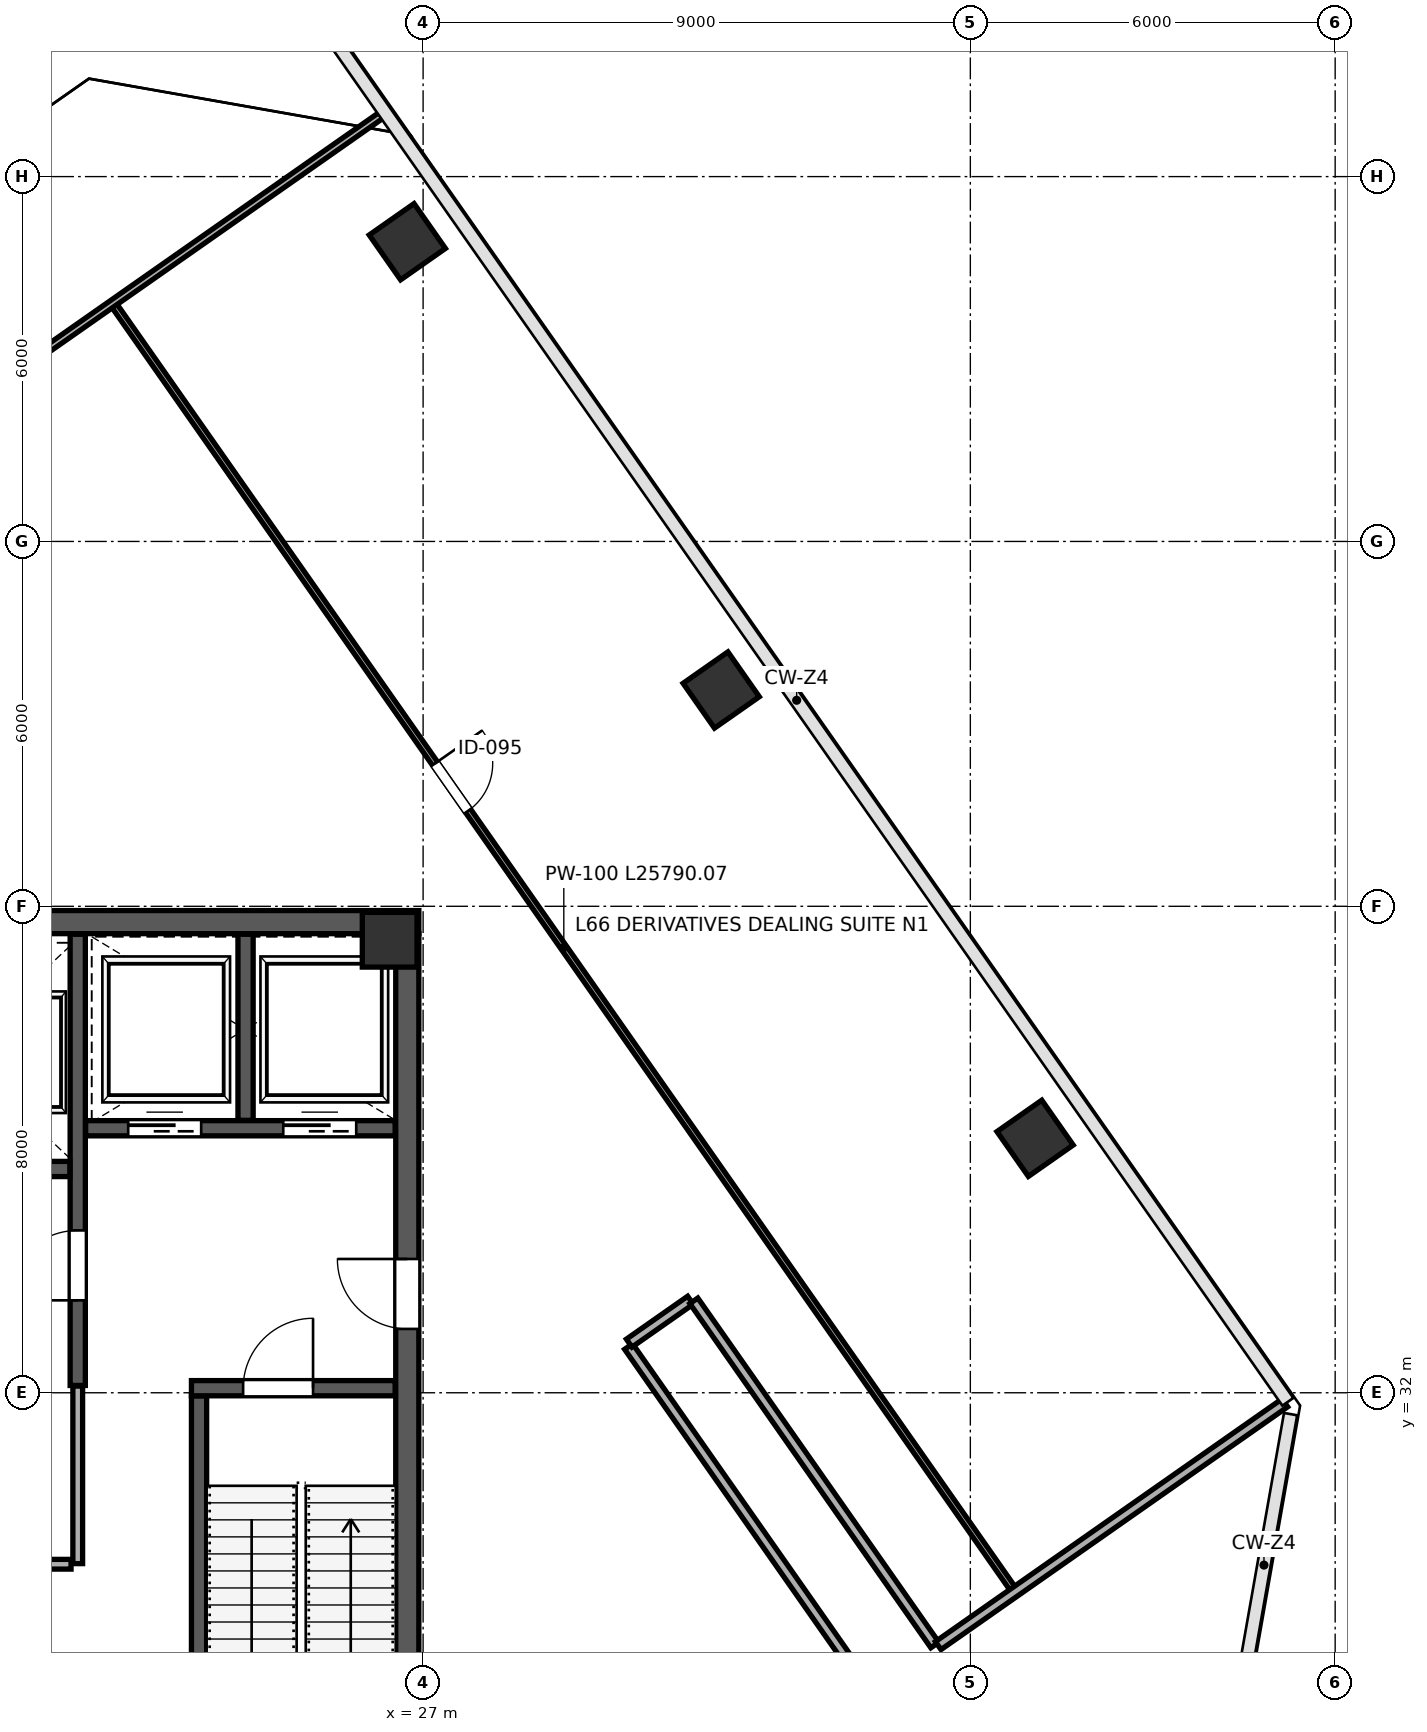
"""IFC4 building model, lengths in metres.
Left out: names, types, materials, properties, quantities, classifications, styles, units other than length and angle.
Written with IfcOpenShell. Run it as: python <this file> out.ifc"""

import sys

from ifc_helpers import new_model, si_unit, direction, frame, frame_2d, origin, origin_2d, place, context, subcontext, project, spatial, rectangle, extrude, source, transform, mapped, element, fill, save


model = new_model("IFC4")
c1 = context("Model", 3, precision=1e-05, world=origin(), true_north=direction((0.0, 1.0)))
c2 = subcontext(c1, "Body", "Model", "MODEL_VIEW")
j1 = project(units=[si_unit("LENGTHUNIT", "METRE"), si_unit("PLANEANGLEUNIT", "RADIAN")], contexts=[c1])
p1 = place(None, origin())
s1 = spatial("IfcSite", under=j1, at=p1, CompositionType="ELEMENT")
p2 = place(p1, origin())
s2 = spatial("IfcBuilding", under=s1, at=p2, CompositionType="ELEMENT")
p3 = place(p2, frame((0.0, 0.0, 293.8)))
s3 = spatial("IfcBuildingStorey", under=s2, at=p3, CompositionType="ELEMENT", Elevation=293.8)
m1 = source(origin(), c2, "Body", "SweptSolid", [
    extrude(rectangle(XDim=0.9, YDim=0.9, at=origin_2d()), origin(), (0.0, 0.0, 1.0), 4.999),
])
p4 = place(p3, frame((26.45, 39.45, 0.001), z_axis=(0.0, 0.0, 1.0), x_axis=(1.0, 0.0, 0.0)))
e1 = element("IfcColumn", 1, at=p4, inside=s3, PredefinedType="COLUMN", context=c2, shape_type="MappedRepresentation", body=[
    mapped(m1, transform((0.0, 0.0, 0.0), scale=1.0)),
])
m2 = source(origin(), c2, "Body", "SweptSolid", [
    extrude(rectangle(XDim=0.9, YDim=0.9, at=origin_2d()), origin(), (0.0, 0.0, 1.0), 4.999),
])
for number, where, z_axis, x_axis in (
    (2, (26.74, 50.929, 0.001), (0.0, 0.0, 1.0), (-0.574, 0.819, 0.0)),
    (3, (31.903, 43.557, 0.001), (0.0, 0.0, 1.0), (-0.574, 0.819, 0.0)),
    (4, (37.065, 36.184, 0.001), (0.0, 0.0, 1.0), (-0.574, 0.819, 0.0)),
):
    element("IfcColumn", number, at=place(p3, frame(where, z_axis=z_axis, x_axis=x_axis)), inside=s3, PredefinedType="COLUMN", context=c2, shape_type="MappedRepresentation", body=[
        mapped(m2, transform((0.0, 0.0, 0.0), scale=1.0)),
    ])
p5 = place(p3, frame((26.74, 24.45, 0.0), z_axis=(0.0, 0.0, 1.0), x_axis=(0.0, 1.0, 0.0)))
e5 = element("IfcWall", 5, at=p5, inside=s3, PredefinedType="SHEAR", context=c2, shape_type="SweptSolid", body=[
    extrude(rectangle(XDim=15.1, YDim=0.38, at=frame_2d((7.55, 0.0))), origin(), (0.0, 0.0, 1.0), 4.76),
])
p6 = place(p5, frame((8.6, 0.0, 0.0)))
e6 = element("IfcOpeningElement", 6, at=p6, cuts=e5, PredefinedType="OPENING", context=c2, shape_type="SweptSolid", body=[
    extrude(rectangle(XDim=1.15, YDim=2.2, at=frame_2d((0.575, 1.1))), frame((0.0, 0.2, 0.0), z_axis=(0.0, -1.0, 0.0), x_axis=(1.0, 0.0, 0.0)), (0.0, 0.0, 1.0), 0.4),
])
p7 = place(p3, frame((9.07, 39.74, 0.0), z_axis=(0.0, 0.0, 1.0), x_axis=(1.0, 0.0, 0.0)))
e7 = element("IfcWall", 7, at=p7, inside=s3, PredefinedType="SHEAR", context=c2, shape_type="SweptSolid", body=[
    extrude(rectangle(XDim=17.86, YDim=0.38, at=frame_2d((8.93, 0.0))), origin(), (0.0, 0.0, 1.0), 4.76),
])
p8 = place(p3, frame((23.315, 24.46, 0.0), z_axis=(0.0, 0.0, 1.0), x_axis=(0.0, 1.0, 0.0)))
e8 = element("IfcWall", 8, at=p8, inside=s3, PredefinedType="SHEAR", context=c2, shape_type="SweptSolid", body=[
    extrude(rectangle(XDim=7.49, YDim=0.25, at=frame_2d((3.745, 0.0))), origin(), (0.0, 0.0, 1.0), 4.76),
])
p9 = place(p3, frame((23.19, 32.075, 0.0), z_axis=(0.0, 0.0, 1.0), x_axis=(1.0, 0.0, 0.0)))
e9 = element("IfcWall", 9, at=p9, inside=s3, PredefinedType="SHEAR", context=c2, shape_type="SweptSolid", body=[
    extrude(rectangle(XDim=3.35, YDim=0.25, at=frame_2d((1.675, 0.0))), origin(), (0.0, 0.0, 1.0), 4.76),
])
p10 = place(p9, frame((0.85, 0.0, 0.0)))
e10 = element("IfcOpeningElement", 10, at=p10, cuts=e9, PredefinedType="OPENING", context=c2, shape_type="SweptSolid", body=[
    extrude(rectangle(XDim=1.15, YDim=2.2, at=frame_2d((0.575, 1.1))), frame((0.0, 0.135, 0.0), z_axis=(0.0, -1.0, 0.0), x_axis=(1.0, 0.0, 0.0)), (0.0, 0.0, 1.0), 0.27),
])
p11 = place(p3, frame((21.32, 32.12, 0.0), z_axis=(0.0, 0.0, 1.0), x_axis=(0.0, 1.0, 0.0)))
e11 = element("IfcWall", 11, at=p11, inside=s3, PredefinedType="SHEAR", context=c2, shape_type="SweptSolid", body=[
    extrude(rectangle(XDim=7.42, YDim=0.25, at=frame_2d((3.71, 0.0))), origin(), (0.0, 0.0, 1.0), 4.76),
])
p12 = place(p11, frame((1.4, 0.0, 0.0)))
e12 = element("IfcOpeningElement", 12, at=p12, cuts=e11, PredefinedType="OPENING", context=c2, shape_type="SweptSolid", body=[
    extrude(rectangle(XDim=1.15, YDim=2.2, at=frame_2d((0.575, 1.1))), frame((0.0, 0.135, 0.0), z_axis=(0.0, -1.0, 0.0), x_axis=(1.0, 0.0, 0.0)), (0.0, 0.0, 1.0), 0.27),
])
p13 = place(p3, frame((21.45, 36.35, 0.0), z_axis=(0.0, 0.0, 1.0), x_axis=(1.0, 0.0, 0.0)))
e13 = element("IfcWall", 13, at=p13, inside=s3, PredefinedType="SHEAR", context=c2, shape_type="SweptSolid", body=[
    extrude(rectangle(XDim=5.09, YDim=0.25, at=frame_2d((2.545, 0.0))), origin(), (0.0, 0.0, 1.0), 4.76),
])
p14 = place(p13, frame((0.7, 0.0, 0.0)))
e14 = element("IfcOpeningElement", 14, at=p14, cuts=e13, PredefinedType="OPENING", context=c2, shape_type="SweptSolid", body=[
    extrude(rectangle(XDim=1.2, YDim=2.2, at=frame_2d((0.6, 1.1))), frame((0.0, 0.135, 0.0), z_axis=(0.0, -1.0, 0.0), x_axis=(1.0, 0.0, 0.0)), (0.0, 0.0, 1.0), 0.27),
])
p15 = place(p13, frame((3.25, 0.0, 0.0)))
e15 = element("IfcOpeningElement", 15, at=p15, cuts=e13, PredefinedType="OPENING", context=c2, shape_type="SweptSolid", body=[
    extrude(rectangle(XDim=1.2, YDim=2.2, at=frame_2d((0.6, 1.1))), frame((0.0, 0.135, 0.0), z_axis=(0.0, -1.0, 0.0), x_axis=(1.0, 0.0, 0.0)), (0.0, 0.0, 1.0), 0.27),
])
p16 = place(p3, frame((24.08, 36.48, 0.0), z_axis=(0.0, 0.0, 1.0), x_axis=(0.0, 1.0, 0.0)))
e16 = element("IfcWall", 16, at=p16, inside=s3, PredefinedType="SHEAR", context=c2, shape_type="SweptSolid", body=[
    extrude(rectangle(XDim=3.06, YDim=0.25, at=frame_2d((1.53, 0.0))), origin(), (0.0, 0.0, 1.0), 4.76),
])
p17 = place(p3, frame((17.32, 35.68, 0.0), z_axis=(0.0, 0.0, 1.0), x_axis=(1.0, 0.0, 0.0)))
e17 = element("IfcWall", 17, at=p17, inside=s3, PredefinedType="SHEAR", context=c2, shape_type="SweptSolid", body=[
    extrude(rectangle(XDim=3.87, YDim=0.25, at=frame_2d((1.935, 0.0))), origin(), (0.0, 0.0, 1.0), 4.76),
])
p18 = place(p17, frame((0.45, 0.0, 0.0)))
e18 = element("IfcOpeningElement", 18, at=p18, cuts=e17, PredefinedType="OPENING", context=c2, shape_type="SweptSolid", body=[
    extrude(rectangle(XDim=1.1, YDim=2.2, at=frame_2d((0.55, 1.1))), frame((0.0, 0.135, 0.0), z_axis=(0.0, -1.0, 0.0), x_axis=(1.0, 0.0, 0.0)), (0.0, 0.0, 1.0), 0.27),
])
p19 = place(p17, frame((2.35, 0.0, 0.0)))
e19 = element("IfcOpeningElement", 19, at=p19, cuts=e17, PredefinedType="OPENING", context=c2, shape_type="SweptSolid", body=[
    extrude(rectangle(XDim=1.1, YDim=2.2, at=frame_2d((0.55, 1.1))), frame((0.0, 0.135, 0.0), z_axis=(0.0, -1.0, 0.0), x_axis=(1.0, 0.0, 0.0)), (0.0, 0.0, 1.0), 0.27),
])
p20 = place(p3, frame((12.84, 29.18, 0.0), z_axis=(0.0, 0.0, 1.0), x_axis=(1.0, 0.0, 0.0)))
e20 = element("IfcWall", 20, at=p20, inside=s3, PredefinedType="PARTITIONING", context=c2, shape_type="SweptSolid", body=[
    extrude(rectangle(XDim=8.37, YDim=0.16, at=frame_2d((4.185, 0.0))), origin(), (0.0, 0.0, 1.0), 4.76),
])
p21 = place(p20, frame((0.95, 0.0, 0.0)))
e21 = element("IfcOpeningElement", 21, at=p21, cuts=e20, PredefinedType="OPENING", context=c2, shape_type="SweptSolid", body=[
    extrude(rectangle(XDim=0.85, YDim=2.1, at=frame_2d((0.425, 1.05))), frame((0.0, 0.09, 0.0), z_axis=(0.0, -1.0, 0.0), x_axis=(1.0, 0.0, 0.0)), (0.0, 0.0, 1.0), 0.18),
])
p22 = place(p20, frame((4.2, 0.0, 0.0)))
e22 = element("IfcOpeningElement", 22, at=p22, cuts=e20, PredefinedType="OPENING", context=c2, shape_type="SweptSolid", body=[
    extrude(rectangle(XDim=0.85, YDim=2.1, at=frame_2d((0.425, 1.05))), frame((0.0, 0.09, 0.0), z_axis=(0.0, -1.0, 0.0), x_axis=(1.0, 0.0, 0.0)), (0.0, 0.0, 1.0), 0.18),
])
p23 = place(p3, frame((21.32, 29.19, 0.0), z_axis=(0.0, 0.0, 1.0), x_axis=(0.0, 1.0, 0.0)))
e23 = element("IfcWall", 23, at=p23, inside=s3, PredefinedType="PARTITIONING", context=c2, shape_type="SweptSolid", body=[
    extrude(rectangle(XDim=2.92, YDim=0.16, at=frame_2d((1.46, 0.0))), origin(), (0.0, 0.0, 1.0), 4.76),
])
p24 = place(p3, frame((21.918, 49.884, 0.0), z_axis=(0.0, 0.0, 1.0), x_axis=(0.57358495776, -0.819146077468, 0.0)))
e24 = element("IfcWall", 24, at=p24, inside=s3, PredefinedType="PARTITIONING", context=c2, shape_type="SweptSolid", body=[
    extrude(rectangle(XDim=25.79, YDim=0.1, at=frame_2d((12.895, 0.0))), origin(), (0.0, 0.0, 1.0), 4.76),
])
p25 = place(p24, frame((9.2, 0.0, 0.0)))
e25 = element("IfcOpeningElement", 25, at=p25, cuts=e24, PredefinedType="OPENING", context=c2, shape_type="SweptSolid", body=[
    extrude(rectangle(XDim=0.95, YDim=2.15, at=frame_2d((0.475, 1.075))), frame((0.0, 0.06, 0.0), z_axis=(0.0, -1.0, 0.0), x_axis=(1.0, 0.0, 0.0)), (0.0, 0.0, 1.0), 0.12),
])
p26 = place(p3, frame((2.071, 36.036, 0.0), z_axis=(0.0, 0.0, 1.0), x_axis=(0.819154854942, 0.573572422302, 0.0)))
e26 = element("IfcWall", 26, at=p26, inside=s3, PredefinedType="PARTITIONING", context=c2, shape_type="SweptSolid", body=[
    extrude(rectangle(XDim=29.62, YDim=0.115, at=frame_2d((14.81, 0.0))), origin(), (0.0, 0.0, 1.0), 4.76),
])
p27 = place(p26, frame((4.2, 0.0, 0.0)))
e27 = element("IfcOpeningElement", 27, at=p27, cuts=e26, PredefinedType="OPENING", context=c2, shape_type="SweptSolid", body=[
    extrude(rectangle(XDim=0.95, YDim=2.15, at=frame_2d((0.475, 1.075))), frame((0.0, 0.067, 0.0), z_axis=(0.0, -1.0, 0.0), x_axis=(1.0, 0.0, 0.0)), (0.0, 0.0, 1.0), 0.135),
])
p28 = place(p3, frame((30.379, 32.76, 0.0), z_axis=(0.0, 0.0, 1.0), x_axis=(0.573609352737, -0.819128995002, 0.0)))
e28 = element("IfcWall", 28, at=p28, inside=s3, PredefinedType="PARTITIONING", context=c2, shape_type="SweptSolid", body=[
    extrude(rectangle(XDim=6.91, YDim=0.16, at=frame_2d((3.455, 0.0))), origin(), (0.0, 0.0, 1.0), 4.76),
])
p29 = place(p3, frame((30.389, 32.816, 0.0), z_axis=(0.0, 0.0, 1.0), x_axis=(0.819129336916, 0.573608864475, 0.0)))
e29 = element("IfcWall", 29, at=p29, inside=s3, PredefinedType="PARTITIONING", context=c2, shape_type="SweptSolid", body=[
    extrude(rectangle(XDim=1.23, YDim=0.16, at=frame_2d((0.615, 0.0))), origin(), (0.0, 0.0, 1.0), 4.76),
])
p30 = place(p3, frame((31.453, 33.512, 0.0), z_axis=(0.0, 0.0, 1.0), x_axis=(0.573585645457, -0.819145595927, 0.0)))
e30 = element("IfcWall", 30, at=p30, inside=s3, PredefinedType="PARTITIONING", context=c2, shape_type="SweptSolid", body=[
    extrude(rectangle(XDim=6.91, YDim=0.16, at=frame_2d((3.455, 0.0))), origin(), (0.0, 0.0, 1.0), 4.76),
])
p31 = place(p3, frame((35.472, 27.842, 0.0), z_axis=(0.0, 0.0, 1.0), x_axis=(0.819151164872, 0.573577692287, 0.0)))
e31 = element("IfcWall", 31, at=p31, inside=s3, PredefinedType="PARTITIONING", context=c2, shape_type="SweptSolid", body=[
    extrude(rectangle(XDim=6.96, YDim=0.16, at=frame_2d((3.48, 0.0))), origin(), (0.0, 0.0, 1.0), 4.76),
])
m3 = source(origin(), c2, "Body", "SweptSolid", [
    extrude(rectangle(XDim=1.15, YDim=2.2, at=frame_2d((0.575, 1.1))), frame((0.0, 0.025, 0.0), z_axis=(0.0, -1.0, 0.0), x_axis=(1.0, 0.0, 0.0)), (0.0, 0.0, 1.0), 0.05),
])
p32 = place(p12, origin())
e32 = element("IfcDoor", 32, at=p32, inside=s3, OperationType="SINGLE_SWING_LEFT", PredefinedType="DOOR", context=c2, shape_type="MappedRepresentation", body=[
    mapped(m3, transform((0.0, 0.0, 0.0), scale=1.0)),
])
fill(e12, e32)
m4 = source(origin(), c2, "Body", "SweptSolid", [
    extrude(rectangle(XDim=1.15, YDim=2.2, at=frame_2d((0.575, 1.1))), frame((0.0, 0.025, 0.0), z_axis=(0.0, -1.0, 0.0), x_axis=(1.0, 0.0, 0.0)), (0.0, 0.0, 1.0), 0.05),
])
p33 = place(p10, origin())
e33 = element("IfcDoor", 33, at=p33, inside=s3, OperationType="SINGLE_SWING_RIGHT", PredefinedType="DOOR", context=c2, shape_type="MappedRepresentation", body=[
    mapped(m4, transform((0.0, 0.0, 0.0), scale=1.0)),
])
fill(e10, e33)
p34 = place(p6, origin())
e34 = element("IfcDoor", 34, at=p34, inside=s3, OperationType="SINGLE_SWING_RIGHT", PredefinedType="DOOR", context=c2, shape_type="MappedRepresentation", body=[
    mapped(m3, transform((0.0, 0.0, 0.0), scale=1.0)),
])
fill(e6, e34)
m5 = source(origin(), c2, "Body", "SweptSolid", [
    extrude(rectangle(XDim=1.2, YDim=2.2, at=frame_2d((0.6, 1.1))), frame((0.0, 0.025, 0.0), z_axis=(0.0, -1.0, 0.0), x_axis=(1.0, 0.0, 0.0)), (0.0, 0.0, 1.0), 0.05),
])
p35 = place(p14, origin())
e35 = element("IfcDoor", 35, at=p35, inside=s3, OperationType="SLIDING_TO_LEFT", PredefinedType="DOOR", context=c2, shape_type="MappedRepresentation", body=[
    mapped(m5, transform((0.0, 0.0, 0.0), scale=1.0)),
])
fill(e14, e35)
p36 = place(p15, origin())
e36 = element("IfcDoor", 36, at=p36, inside=s3, OperationType="SLIDING_TO_RIGHT", PredefinedType="DOOR", context=c2, shape_type="MappedRepresentation", body=[
    mapped(m5, transform((0.0, 0.0, 0.0), scale=1.0)),
])
fill(e15, e36)
m6 = source(origin(), c2, "Body", "SweptSolid", [
    extrude(rectangle(XDim=0.95, YDim=2.15, at=frame_2d((0.475, 1.075))), frame((0.0, 0.025, 0.0), z_axis=(0.0, -1.0, 0.0), x_axis=(1.0, 0.0, 0.0)), (0.0, 0.0, 1.0), 0.05),
])
p37 = place(p25, origin())
e37 = element("IfcDoor", 37, at=p37, inside=s3, OperationType="SINGLE_SWING_LEFT", PredefinedType="DOOR", context=c2, shape_type="MappedRepresentation", body=[
    mapped(m6, transform((0.0, 0.0, 0.0), scale=1.0)),
])
fill(e25, e37)
save(model, sys.argv[1])
